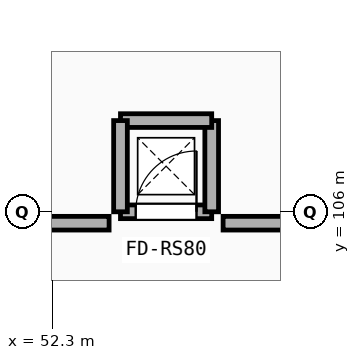
"""IFC4 building model, lengths in metres.
Left out: names, types, materials, properties, quantities, classifications, styles, units other than length and angle.
Written with IfcOpenShell. Run it as: python <this file> out.ifc"""

import sys

from ifc_helpers import new_model, si_unit, direction, frame, frame_2d, origin, place, context, subcontext, project, spatial, rectangle, extrude, element, fill, save


model = new_model("IFC4")
c1 = context("Model", 3, precision=1e-05, world=origin(), true_north=direction((0.0, 1.0)))
c2 = subcontext(c1, "Body", "Model", "MODEL_VIEW")
j1 = project(units=[si_unit("LENGTHUNIT", "METRE"), si_unit("PLANEANGLEUNIT", "RADIAN")], contexts=[c1])
p1 = place(None, origin())
s1 = spatial("IfcSite", under=j1, at=p1, CompositionType="ELEMENT")
p2 = place(p1, origin())
s2 = spatial("IfcBuilding", under=s1, at=p2, CompositionType="ELEMENT")
p3 = place(p2, frame((0.0, 0.0, 21.6)))
s3 = spatial("IfcBuildingStorey", under=s2, at=p3, CompositionType="ELEMENT", Elevation=21.6)
p4 = place(p3, frame((46.14, 105.85, 0.0), z_axis=(0.0, 0.0, 1.0), x_axis=(1.0, 0.0, 0.0)))
e1 = element("IfcWall", 1, at=p4, inside=s3, PredefinedType="PARTITIONING", context=c2, shape_type="SweptSolid", body=[
    extrude(rectangle(XDim=6.91, YDim=0.18, at=frame_2d((3.455, 0.0))), origin(), (0.0, 0.0, 1.0), 2.71),
])
p5 = place(p4, frame((2.389, 0.0, -0.01)))
e2 = element("IfcOpeningElement", 2, at=p5, cuts=e1, PredefinedType="OPENING", context=c2, shape_type="SweptSolid", body=[
    extrude(rectangle(XDim=1.6, YDim=2.21, at=frame_2d((0.8, 1.105))), frame((0.0, 0.1, 0.0), z_axis=(0.0, -1.0, 0.0), x_axis=(1.0, 0.0, 0.0)), (0.0, 0.0, 1.0), 0.2),
])
p6 = place(p3, frame((54.55, 105.85, 0.0), z_axis=(0.0, 0.0, 1.0), x_axis=(1.0, 0.0, 0.0)))
e3 = element("IfcWall", 3, at=p6, inside=s3, PredefinedType="PARTITIONING", context=c2, shape_type="SweptSolid", body=[
    extrude(rectangle(XDim=5.75, YDim=0.18, at=frame_2d((2.875, 0.0))), origin(), (0.0, 0.0, 1.0), 2.71),
])
p7 = place(p3, frame((53.2, 106.0, 0.0), z_axis=(0.0, 0.0, 1.0), x_axis=(1.0, 0.0, 0.0)))
e4 = element("IfcWall", 4, at=p7, inside=s3, PredefinedType="SOLIDWALL", context=c2, shape_type="SweptSolid", body=[
    extrude(rectangle(XDim=1.2, YDim=0.18, at=frame_2d((0.6, 0.0))), origin(), (0.0, 0.0, 1.0), 3.35),
])
p8 = place(p7, frame((0.2, 0.0, -0.01)))
e5 = element("IfcOpeningElement", 5, at=p8, cuts=e4, PredefinedType="OPENING", context=c2, shape_type="SweptSolid", body=[
    extrude(rectangle(XDim=0.8, YDim=2.06, at=frame_2d((0.4, 1.03))), frame((0.0, 0.1, 0.0), z_axis=(0.0, -1.0, 0.0), x_axis=(1.0, 0.0, 0.0)), (0.0, 0.0, 1.0), 0.2),
])
for number, where, z_axis, x_axis in (
    (6, (54.4, 106.0, 0.0), (0.0, 0.0, 1.0), (0.0, 1.0, 0.0)),
    (7, (54.4, 107.2, 0.0), (0.0, 0.0, 1.0), (-1.0, 0.0, 0.0)),
    (8, (53.2, 107.2, 0.0), (0.0, 0.0, 1.0), (0.0, -1.0, 0.0)),
):
    element("IfcWall", number, at=place(p3, frame(where, z_axis=z_axis, x_axis=x_axis)), inside=s3, PredefinedType="SOLIDWALL", context=c2, shape_type="SweptSolid", body=[
        extrude(rectangle(XDim=1.2, YDim=0.18, at=frame_2d((0.6, 0.0))), origin(), (0.0, 0.0, 1.0), 3.35),
    ])
p9 = place(p8, frame((0.0, 0.0, 0.01)))
e9 = element("IfcDoor", 9, at=p9, inside=s3, OperationType="SINGLE_SWING_RIGHT", PredefinedType="DOOR", context=c2, shape_type="SweptSolid", body=[
    extrude(rectangle(XDim=0.8, YDim=2.05, at=frame_2d((0.4, 1.025))), frame((0.0, 0.025, 0.0), z_axis=(0.0, -1.0, 0.0), x_axis=(1.0, 0.0, 0.0)), (0.0, 0.0, 1.0), 0.05),
])
fill(e5, e9)
save(model, sys.argv[1])
